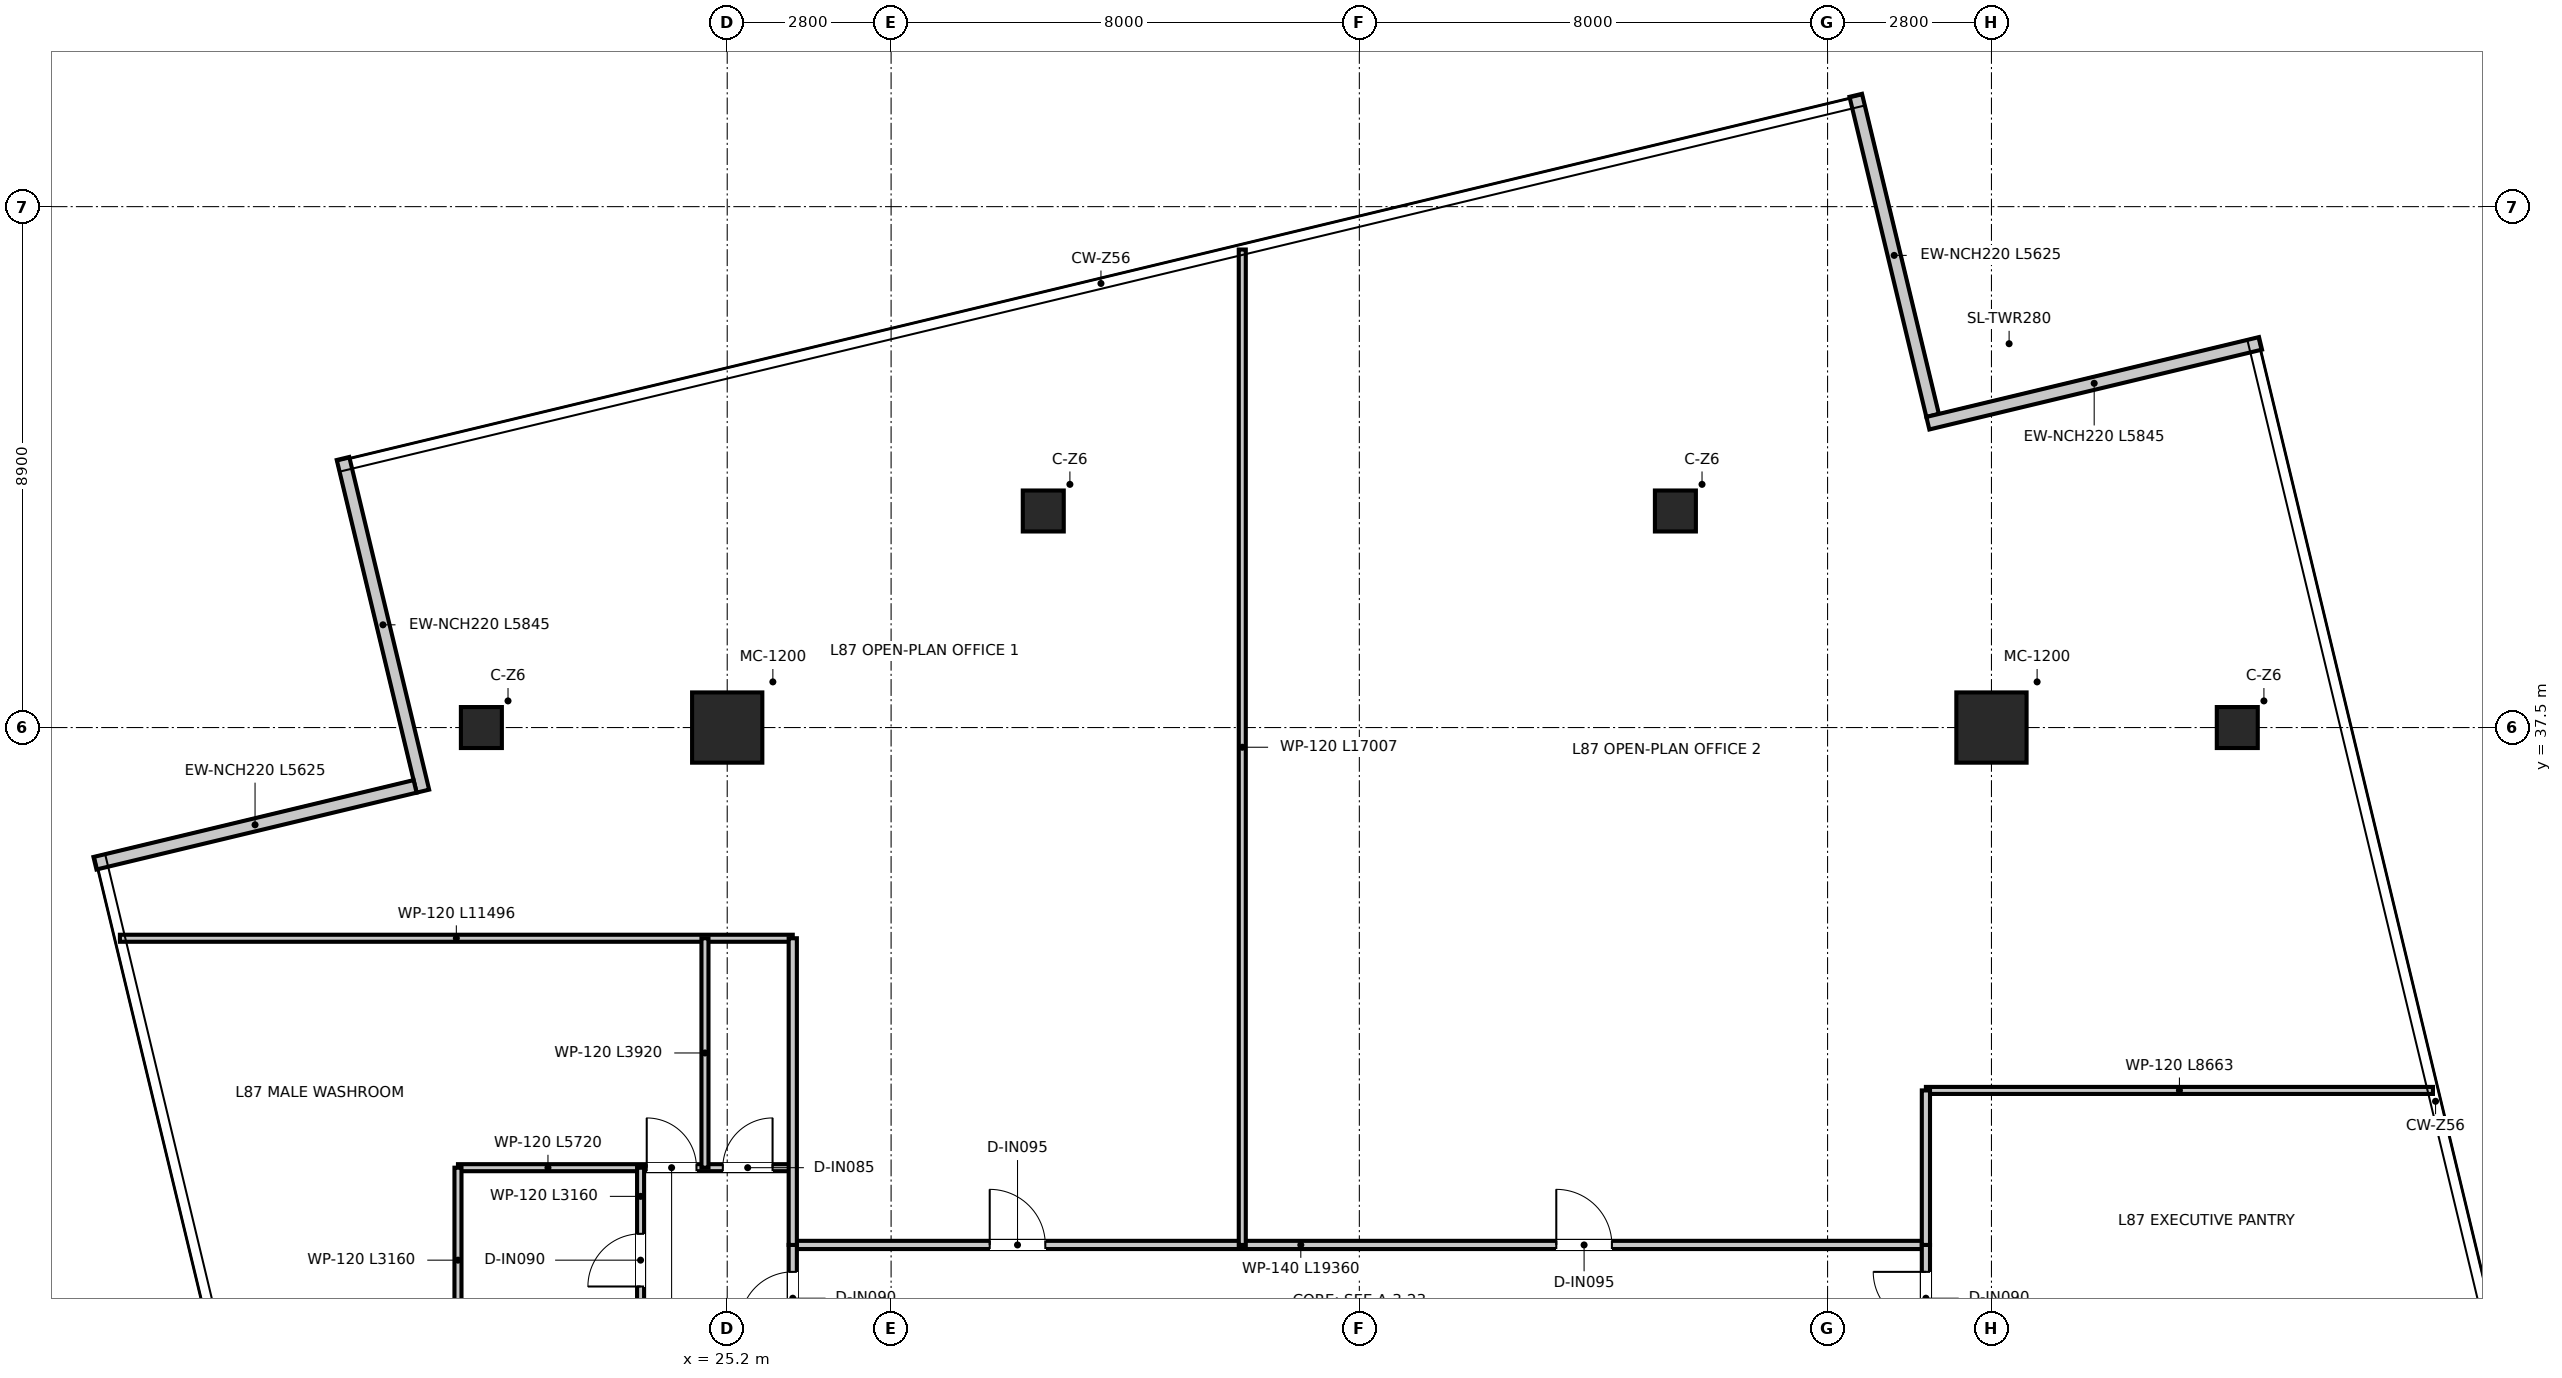
"""IFC4 building model, lengths in metres.
Left out: names, types, materials, properties, quantities, classifications, styles, units other than length and angle.
Written with IfcOpenShell. Run it as: python <this file> out.ifc"""

import sys

from ifc_helpers import new_model, si_unit, direction, frame, frame_2d, origin, origin_2d, place, context, subcontext, project, spatial, rectangle, extrude, source, transform, mapped, element, fill, save


model = new_model("IFC4")
c1 = context("Model", 3, precision=1e-05, world=origin(), true_north=direction((0.0, 1.0)))
c2 = subcontext(c1, "Body", "Model", "MODEL_VIEW")
j1 = project(units=[si_unit("LENGTHUNIT", "METRE"), si_unit("PLANEANGLEUNIT", "RADIAN")], contexts=[c1])
p1 = place(None, origin())
s1 = spatial("IfcSite", under=j1, at=p1, CompositionType="ELEMENT")
p2 = place(p1, origin())
s2 = spatial("IfcBuilding", under=s1, at=p2, CompositionType="ELEMENT")
p3 = place(p2, frame((0.0, 0.0, 355.35)))
s3 = spatial("IfcBuildingStorey", under=s2, at=p3, CompositionType="ELEMENT", Elevation=355.35)
m1 = source(origin(), c2, "Body", "SweptSolid", [
    extrude(rectangle(XDim=1.2, YDim=1.2, at=origin_2d()), origin(), (0.0, 0.0, 1.0), 3.95),
])
for number, where, z_axis, x_axis in (
    (1, (46.8, 37.5, 0.0), (0.0, 0.0, 1.0), (1.0, 0.0, 0.0)),
    (2, (25.2, 37.5, 0.0), (0.0, 0.0, 1.0), (1.0, 0.0, 0.0)),
):
    element("IfcColumn", number, at=place(p3, frame(where, z_axis=z_axis, x_axis=x_axis)), inside=s3, PredefinedType="USERDEFINED", context=c2, shape_type="MappedRepresentation", body=[
        mapped(m1, transform((0.0, 0.0, 0.0), x_axis=(1.0, 0.0, 0.0), y_axis=(0.0, 1.0, 0.0), z_axis=(0.0, 0.0, 1.0), scale=1.0)),
    ])
m2 = source(origin(), c2, "Body", "SweptSolid", [
    extrude(rectangle(XDim=0.7, YDim=0.7, at=origin_2d()), origin(), (0.0, 0.0, 1.0), 3.95),
])
for number, where, z_axis, x_axis in (
    (3, (21.0, 37.5, 0.0), (0.0, 0.0, 1.0), (1.0, 0.0, 0.0)),
    (4, (30.6, 41.2, 0.0), (0.0, 0.0, 1.0), (1.0, 0.0, 0.0)),
    (5, (41.4, 41.2, 0.0), (0.0, 0.0, 1.0), (1.0, 0.0, 0.0)),
    (6, (51.0, 37.5, 0.0), (0.0, 0.0, 1.0), (1.0, 0.0, 0.0)),
):
    element("IfcColumn", number, at=place(p3, frame(where, z_axis=z_axis, x_axis=x_axis)), inside=s3, PredefinedType="COLUMN", context=c2, shape_type="MappedRepresentation", body=[
        mapped(m2, transform((0.0, 0.0, 0.0), x_axis=(1.0, 0.0, 0.0), y_axis=(0.0, 1.0, 0.0), z_axis=(0.0, 0.0, 1.0), scale=1.0)),
    ])
p4 = place(p3, frame((45.795, 42.832, 0.0), z_axis=(0.0, 0.0, 1.0), x_axis=(-0.233466521361, 0.972364840687, 0.0)))
e7 = element("IfcWall", 7, at=p4, inside=s3, PredefinedType="ELEMENTEDWALL", context=c2, shape_type="SweptSolid", body=[
    extrude(rectangle(XDim=5.625, YDim=0.22, at=frame_2d((2.812, 0.0))), origin(), (0.0, 0.0, 1.0), 3.67),
])
p5 = place(p3, frame((18.636, 42.097, 0.0), z_axis=(0.0, 0.0, 1.0), x_axis=(0.233444040416, -0.972370238126, 0.0)))
e8 = element("IfcWall", 8, at=p5, inside=s3, PredefinedType="ELEMENTEDWALL", context=c2, shape_type="SweptSolid", body=[
    extrude(rectangle(XDim=5.845, YDim=0.22, at=frame_2d((2.922, 0.0))), origin(), (0.0, 0.0, 1.0), 3.67),
])
p6 = place(p3, frame((19.868, 36.495, 0.0), z_axis=(0.0, 0.0, 1.0), x_axis=(-0.972364840687, -0.233466521361, 0.0)))
e9 = element("IfcWall", 9, at=p6, inside=s3, PredefinedType="ELEMENTEDWALL", context=c2, shape_type="SweptSolid", body=[
    extrude(rectangle(XDim=5.625, YDim=0.22, at=frame_2d((2.812, 0.0))), origin(), (0.0, 0.0, 1.0), 3.67),
])
p7 = place(p3, frame((51.397, 44.064, 0.0), z_axis=(0.0, 0.0, 1.0), x_axis=(-0.972367961768, -0.233453521986, 0.0)))
e10 = element("IfcWall", 10, at=p7, inside=s3, PredefinedType="ELEMENTEDWALL", context=c2, shape_type="SweptSolid", body=[
    extrude(rectangle(XDim=5.845, YDim=0.22, at=frame_2d((2.922, 0.0))), origin(), (0.0, 0.0, 1.0), 3.67),
])
p8 = place(p3, frame((26.32, 28.66, 0.0), z_axis=(0.0, 0.0, 1.0), x_axis=(1.0, 0.0, 0.0)))
e11 = element("IfcWall", 11, at=p8, inside=s3, PredefinedType="PARTITIONING", context=c2, shape_type="SweptSolid", body=[
    extrude(rectangle(XDim=19.36, YDim=0.14, at=frame_2d((9.68, 0.0))), origin(), (0.0, 0.0, 1.0), 3.18),
])
p9 = place(p8, frame((3.365, 0.0, 0.0)))
e12 = element("IfcOpeningElement", 12, at=p9, cuts=e11, PredefinedType="OPENING", context=c2, shape_type="SweptSolid", body=[
    extrude(rectangle(XDim=0.95, YDim=2.1, at=frame_2d((0.475, 1.05))), frame((0.0, 0.08, 0.0), z_axis=(0.0, -1.0, 0.0), x_axis=(1.0, 0.0, 0.0)), (0.0, 0.0, 1.0), 0.16),
])
p10 = place(p8, frame((13.045, 0.0, 0.0)))
e13 = element("IfcOpeningElement", 13, at=p10, cuts=e11, PredefinedType="OPENING", context=c2, shape_type="SweptSolid", body=[
    extrude(rectangle(XDim=0.95, YDim=2.1, at=frame_2d((0.475, 1.05))), frame((0.0, 0.08, 0.0), z_axis=(0.0, -1.0, 0.0), x_axis=(1.0, 0.0, 0.0)), (0.0, 0.0, 1.0), 0.16),
])
p11 = place(p3, frame((26.32, 13.0, 0.0), z_axis=(0.0, 0.0, 1.0), x_axis=(0.0, 1.0, 0.0)))
e14 = element("IfcWall", 14, at=p11, inside=s3, PredefinedType="PARTITIONING", context=c2, shape_type="SweptSolid", body=[
    extrude(rectangle(XDim=15.66, YDim=0.14, at=frame_2d((7.83, 0.0))), origin(), (0.0, 0.0, 1.0), 3.13),
])
p12 = place(p11, frame((14.3, 0.0, 0.0)))
e15 = element("IfcOpeningElement", 15, at=p12, cuts=e14, PredefinedType="OPENING", context=c2, shape_type="SweptSolid", body=[
    extrude(rectangle(XDim=0.9, YDim=2.1, at=frame_2d((0.45, 1.05))), frame((0.0, 0.08, 0.0), z_axis=(0.0, -1.0, 0.0), x_axis=(1.0, 0.0, 0.0)), (0.0, 0.0, 1.0), 0.16),
])
p13 = place(p11, frame((6.55, 0.0, 0.0)))
e16 = element("IfcOpeningElement", 16, at=p13, cuts=e14, PredefinedType="OPENING", context=c2, shape_type="SweptSolid", body=[
    extrude(rectangle(XDim=0.9, YDim=2.1, at=frame_2d((0.45, 1.05))), frame((0.0, 0.08, 0.0), z_axis=(0.0, -1.0, 0.0), x_axis=(1.0, 0.0, 0.0)), (0.0, 0.0, 1.0), 0.16),
])
p14 = place(p11, frame((11.21, 0.0, 0.0)))
e17 = element("IfcOpeningElement", 17, at=p14, cuts=e14, PredefinedType="OPENING", context=c2, shape_type="SweptSolid", body=[
    extrude(rectangle(XDim=0.9, YDim=2.1, at=frame_2d((0.45, 1.05))), frame((0.0, 0.08, 0.0), z_axis=(0.0, -1.0, 0.0), x_axis=(1.0, 0.0, 0.0)), (0.0, 0.0, 1.0), 0.16),
])
p15 = place(p3, frame((45.68, 13.0, 0.0), z_axis=(0.0, 0.0, 1.0), x_axis=(0.0, 1.0, 0.0)))
e18 = element("IfcWall", 18, at=p15, inside=s3, PredefinedType="PARTITIONING", context=c2, shape_type="SweptSolid", body=[
    extrude(rectangle(XDim=15.66, YDim=0.14, at=frame_2d((7.83, 0.0))), origin(), (0.0, 0.0, 1.0), 3.13),
])
p16 = place(p15, frame((14.3, 0.0, 0.0)))
e19 = element("IfcOpeningElement", 19, at=p16, cuts=e18, PredefinedType="OPENING", context=c2, shape_type="SweptSolid", body=[
    extrude(rectangle(XDim=0.9, YDim=2.1, at=frame_2d((0.45, 1.05))), frame((0.0, 0.08, 0.0), z_axis=(0.0, -1.0, 0.0), x_axis=(1.0, 0.0, 0.0)), (0.0, 0.0, 1.0), 0.16),
])
p17 = place(p15, frame((6.55, 0.0, 0.0)))
e20 = element("IfcOpeningElement", 20, at=p17, cuts=e18, PredefinedType="OPENING", context=c2, shape_type="SweptSolid", body=[
    extrude(rectangle(XDim=0.9, YDim=2.1, at=frame_2d((0.45, 1.05))), frame((0.0, 0.08, 0.0), z_axis=(0.0, -1.0, 0.0), x_axis=(1.0, 0.0, 0.0)), (0.0, 0.0, 1.0), 0.16),
])
p18 = place(p15, frame((11.21, 0.0, 0.0)))
e21 = element("IfcOpeningElement", 21, at=p18, cuts=e18, PredefinedType="OPENING", context=c2, shape_type="SweptSolid", body=[
    extrude(rectangle(XDim=0.9, YDim=2.1, at=frame_2d((0.45, 1.05))), frame((0.0, 0.08, 0.0), z_axis=(0.0, -1.0, 0.0), x_axis=(1.0, 0.0, 0.0)), (0.0, 0.0, 1.0), 0.16),
])
p19 = place(p3, frame((14.824, 33.9, 0.0), z_axis=(0.0, 0.0, 1.0), x_axis=(1.0, 0.0, 0.0)))
e22 = element("IfcWall", 22, at=p19, inside=s3, PredefinedType="PARTITIONING", context=c2, shape_type="SweptSolid", body=[
    extrude(rectangle(XDim=11.496, YDim=0.12, at=frame_2d((5.748, 0.0))), origin(), (0.0, 0.0, 1.0), 3.13),
])
p20 = place(p3, frame((20.6, 29.98, 0.0), z_axis=(0.0, 0.0, 1.0), x_axis=(1.0, 0.0, 0.0)))
e23 = element("IfcWall", 23, at=p20, inside=s3, PredefinedType="PARTITIONING", context=c2, shape_type="SweptSolid", body=[
    extrude(rectangle(XDim=5.72, YDim=0.12, at=frame_2d((2.86, 0.0))), origin(), (0.0, 0.0, 1.0), 3.13),
])
p21 = place(p20, frame((3.225, 0.0, 0.0)))
e24 = element("IfcOpeningElement", 24, at=p21, cuts=e23, PredefinedType="OPENING", context=c2, shape_type="SweptSolid", body=[
    extrude(rectangle(XDim=0.85, YDim=2.1, at=frame_2d((0.425, 1.05))), frame((0.0, 0.07, 0.0), z_axis=(0.0, -1.0, 0.0), x_axis=(1.0, 0.0, 0.0)), (0.0, 0.0, 1.0), 0.14),
])
p22 = place(p20, frame((4.525, 0.0, 0.0)))
e25 = element("IfcOpeningElement", 25, at=p22, cuts=e23, PredefinedType="OPENING", context=c2, shape_type="SweptSolid", body=[
    extrude(rectangle(XDim=0.85, YDim=2.1, at=frame_2d((0.425, 1.05))), frame((0.0, 0.07, 0.0), z_axis=(0.0, -1.0, 0.0), x_axis=(1.0, 0.0, 0.0)), (0.0, 0.0, 1.0), 0.14),
])
p23 = place(p3, frame((20.6, 26.82, 0.0), z_axis=(0.0, 0.0, 1.0), x_axis=(0.0, 1.0, 0.0)))
e26 = element("IfcWall", 26, at=p23, inside=s3, PredefinedType="PARTITIONING", context=c2, shape_type="SweptSolid", body=[
    extrude(rectangle(XDim=3.16, YDim=0.12, at=frame_2d((1.58, 0.0))), origin(), (0.0, 0.0, 1.0), 3.67),
])
p24 = place(p3, frame((23.72, 26.82, 0.0), z_axis=(0.0, 0.0, 1.0), x_axis=(0.0, 1.0, 0.0)))
e27 = element("IfcWall", 27, at=p24, inside=s3, PredefinedType="PARTITIONING", context=c2, shape_type="SweptSolid", body=[
    extrude(rectangle(XDim=3.16, YDim=0.12, at=frame_2d((1.58, 0.0))), origin(), (0.0, 0.0, 1.0), 3.18),
])
p25 = place(p24, frame((1.13, 0.0, 0.0)))
e28 = element("IfcOpeningElement", 28, at=p25, cuts=e27, PredefinedType="OPENING", context=c2, shape_type="SweptSolid", body=[
    extrude(rectangle(XDim=0.9, YDim=2.1, at=frame_2d((0.45, 1.05))), frame((0.0, 0.07, 0.0), z_axis=(0.0, -1.0, 0.0), x_axis=(1.0, 0.0, 0.0)), (0.0, 0.0, 1.0), 0.14),
])
p26 = place(p3, frame((24.82, 29.98, 0.0), z_axis=(0.0, 0.0, 1.0), x_axis=(0.0, 1.0, 0.0)))
e29 = element("IfcWall", 29, at=p26, inside=s3, PredefinedType="PARTITIONING", context=c2, shape_type="SweptSolid", body=[
    extrude(rectangle(XDim=3.92, YDim=0.12, at=frame_2d((1.96, 0.0))), origin(), (0.0, 0.0, 1.0), 3.37),
])
p27 = place(p3, frame((45.68, 31.3, 0.0), z_axis=(0.0, 0.0, 1.0), x_axis=(1.0, 0.0, 0.0)))
e30 = element("IfcWall", 30, at=p27, inside=s3, PredefinedType="PARTITIONING", context=c2, shape_type="SweptSolid", body=[
    extrude(rectangle(XDim=8.663, YDim=0.12, at=frame_2d((4.332, 0.0))), origin(), (0.0, 0.0, 1.0), 3.13),
])
p28 = place(p3, frame((26.32, 28.66, 0.0), z_axis=(0.0, 0.0, 1.0), x_axis=(0.0, 1.0, 0.0)))
e31 = element("IfcWall", 31, at=p28, inside=s3, PredefinedType="PARTITIONING", context=c2, shape_type="SweptSolid", body=[
    extrude(rectangle(XDim=5.24, YDim=0.14, at=frame_2d((2.62, 0.0))), origin(), (0.0, 0.0, 1.0), 3.43),
])
p29 = place(p3, frame((45.68, 28.66, 0.0), z_axis=(0.0, 0.0, 1.0), x_axis=(0.0, 1.0, 0.0)))
e32 = element("IfcWall", 32, at=p29, inside=s3, PredefinedType="PARTITIONING", context=c2, shape_type="SweptSolid", body=[
    extrude(rectangle(XDim=2.64, YDim=0.14, at=frame_2d((1.32, 0.0))), origin(), (0.0, 0.0, 1.0), 3.43),
])
p30 = place(p3, frame((34.0, 28.66, 0.0), z_axis=(0.0, 0.0, 1.0), x_axis=(0.0, 1.0, 0.0)))
e33 = element("IfcWall", 33, at=p30, inside=s3, PredefinedType="PARTITIONING", context=c2, shape_type="SweptSolid", body=[
    extrude(rectangle(XDim=17.007, YDim=0.12, at=frame_2d((8.504, 0.0))), origin(), (0.0, 0.0, 1.0), 3.13),
])
p31 = place(p12, origin())
e34 = element("IfcDoor", 34, at=p31, inside=s3, OperationType="SINGLE_SWING_LEFT", PredefinedType="DOOR", context=c2, shape_type="SweptSolid", body=[
    extrude(rectangle(XDim=0.9, YDim=2.1, at=frame_2d((0.45, 1.05))), frame((0.0, 0.025, 0.0), z_axis=(0.0, -1.0, 0.0), x_axis=(1.0, 0.0, 0.0)), (0.0, 0.0, 1.0), 0.05),
])
fill(e15, e34)
p32 = place(p16, origin())
e35 = element("IfcDoor", 35, at=p32, inside=s3, OperationType="SINGLE_SWING_RIGHT", PredefinedType="DOOR", context=c2, shape_type="SweptSolid", body=[
    extrude(rectangle(XDim=0.9, YDim=2.1, at=frame_2d((0.45, 1.05))), frame((0.0, 0.025, 0.0), z_axis=(0.0, -1.0, 0.0), x_axis=(1.0, 0.0, 0.0)), (0.0, 0.0, 1.0), 0.05),
])
fill(e19, e35)
p33 = place(p21, origin())
e36 = element("IfcDoor", 36, at=p33, inside=s3, OperationType="SINGLE_SWING_LEFT", PredefinedType="DOOR", context=c2, shape_type="SweptSolid", body=[
    extrude(rectangle(XDim=0.85, YDim=2.1, at=frame_2d((0.425, 1.05))), frame((0.0, 0.025, 0.0), z_axis=(0.0, -1.0, 0.0), x_axis=(1.0, 0.0, 0.0)), (0.0, 0.0, 1.0), 0.05),
])
fill(e24, e36)
p34 = place(p22, origin())
e37 = element("IfcDoor", 37, at=p34, inside=s3, OperationType="SINGLE_SWING_RIGHT", PredefinedType="DOOR", context=c2, shape_type="SweptSolid", body=[
    extrude(rectangle(XDim=0.85, YDim=2.1, at=frame_2d((0.425, 1.05))), frame((0.0, 0.025, 0.0), z_axis=(0.0, -1.0, 0.0), x_axis=(1.0, 0.0, 0.0)), (0.0, 0.0, 1.0), 0.05),
])
fill(e25, e37)
p35 = place(p25, origin())
e38 = element("IfcDoor", 38, at=p35, inside=s3, OperationType="SINGLE_SWING_LEFT", PredefinedType="DOOR", context=c2, shape_type="SweptSolid", body=[
    extrude(rectangle(XDim=0.9, YDim=2.1, at=frame_2d((0.45, 1.05))), frame((0.0, 0.025, 0.0), z_axis=(0.0, -1.0, 0.0), x_axis=(1.0, 0.0, 0.0)), (0.0, 0.0, 1.0), 0.05),
])
fill(e28, e38)
p36 = place(p9, origin())
e39 = element("IfcDoor", 39, at=p36, inside=s3, OperationType="SINGLE_SWING_LEFT", PredefinedType="DOOR", context=c2, shape_type="SweptSolid", body=[
    extrude(rectangle(XDim=0.95, YDim=2.1, at=frame_2d((0.475, 1.05))), frame((0.0, 0.025, 0.0), z_axis=(0.0, -1.0, 0.0), x_axis=(1.0, 0.0, 0.0)), (0.0, 0.0, 1.0), 0.05),
])
fill(e12, e39)
p37 = place(p10, origin())
e40 = element("IfcDoor", 40, at=p37, inside=s3, OperationType="SINGLE_SWING_LEFT", PredefinedType="DOOR", context=c2, shape_type="SweptSolid", body=[
    extrude(rectangle(XDim=0.95, YDim=2.1, at=frame_2d((0.475, 1.05))), frame((0.0, 0.025, 0.0), z_axis=(0.0, -1.0, 0.0), x_axis=(1.0, 0.0, 0.0)), (0.0, 0.0, 1.0), 0.05),
])
fill(e13, e40)
save(model, sys.argv[1])
